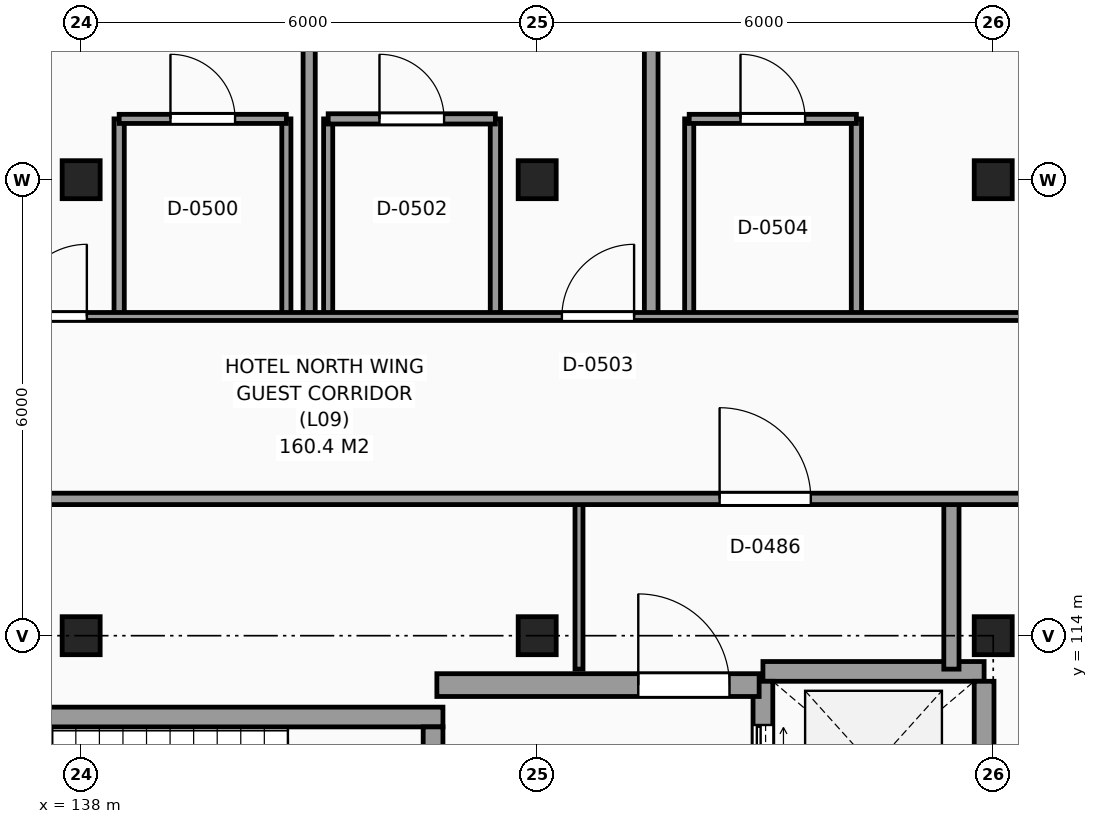
"""IFC4 building model, lengths in metres.
Left out: names, types, materials, properties, quantities, classifications, styles, units other than length and angle.
Written with IfcOpenShell. Run it as: python <this file> out.ifc"""

import sys

from ifc_helpers import new_model, si_unit, direction, frame, frame_2d, origin, origin_2d, place, context, subcontext, project, spatial, rectangle, extrude, element, fill, save


model = new_model("IFC4")
c1 = context("Model", 3, precision=1e-05, world=origin(), true_north=direction((0.0, 1.0)))
c2 = subcontext(c1, "Body", "Model", "MODEL_VIEW")
j1 = project(units=[si_unit("LENGTHUNIT", "METRE"), si_unit("PLANEANGLEUNIT", "RADIAN")], contexts=[c1])
p1 = place(None, origin())
s1 = spatial("IfcSite", under=j1, at=p1, CompositionType="ELEMENT")
p2 = place(p1, origin())
s2 = spatial("IfcBuilding", under=s1, at=p2, CompositionType="ELEMENT")
p3 = place(p2, frame((0.0, 0.0, 38.1)))
s3 = spatial("IfcBuildingStorey", under=s2, at=p3, CompositionType="ELEMENT", Elevation=38.1)
for number, where, z_axis, x_axis in (
    (1, (138.0, 114.0, 0.0), (0.0, 0.0, 1.0), (1.0, 0.0, 0.0)),
    (2, (138.0, 120.0, 0.0), (0.0, 0.0, 1.0), (1.0, 0.0, 0.0)),
    (3, (144.0, 114.0, 0.0), (0.0, 0.0, 1.0), (1.0, 0.0, 0.0)),
    (4, (144.0, 120.0, 0.0), (0.0, 0.0, 1.0), (1.0, 0.0, 0.0)),
    (5, (150.0, 114.0, 0.0), (0.0, 0.0, 1.0), (1.0, 0.0, 0.0)),
    (6, (150.0, 120.0, 0.0), (0.0, 0.0, 1.0), (1.0, 0.0, 0.0)),
):
    element("IfcColumn", number, at=place(p3, frame(where, z_axis=z_axis, x_axis=x_axis)), inside=s3, PredefinedType="COLUMN", context=c2, shape_type="SweptSolid", body=[
        extrude(rectangle(XDim=0.5, YDim=0.5, at=origin_2d()), origin(), (0.0, 0.0, 1.0), 3.3),
    ])
p4 = place(p3, frame((132.04, 112.93, 0.0), z_axis=(0.0, 0.0, 1.0), x_axis=(1.0, 0.0, 0.0)))
e7 = element("IfcWall", 7, at=p4, inside=s3, PredefinedType="SHEAR", context=c2, shape_type="SweptSolid", body=[
    extrude(rectangle(XDim=10.72, YDim=0.26, at=frame_2d((5.36, 0.0))), origin(), (0.0, 0.0, 1.0), 3.3),
])
p5 = place(p3, frame((142.63, 109.2, 0.0), z_axis=(0.0, 0.0, 1.0), x_axis=(0.0, 1.0, 0.0)))
e8 = element("IfcWall", 8, at=p5, inside=s3, PredefinedType="SHEAR", context=c2, shape_type="SweptSolid", body=[
    extrude(rectangle(XDim=3.6, YDim=0.26, at=frame_2d((1.8, 0.0))), origin(), (0.0, 0.0, 1.0), 3.3),
])
p6 = place(p5, frame((1.25, 0.0, 0.0)))
e9 = element("IfcOpeningElement", 9, at=p6, cuts=e8, PredefinedType="OPENING", context=c2, shape_type="SweptSolid", body=[
    extrude(rectangle(XDim=1.1, YDim=2.15, at=frame_2d((0.55, 1.075))), frame((0.0, 0.14, 0.0), z_axis=(0.0, -1.0, 0.0), x_axis=(1.0, 0.0, 0.0)), (0.0, 0.0, 1.0), 0.28),
])
p7 = place(p3, frame((146.97, 113.53, 0.0), z_axis=(0.0, 0.0, 1.0), x_axis=(1.0, 0.0, 0.0)))
e10 = element("IfcWall", 10, at=p7, inside=s3, PredefinedType="SHEAR", context=c2, shape_type="SweptSolid", body=[
    extrude(rectangle(XDim=2.91, YDim=0.26, at=frame_2d((1.455, 0.0))), origin(), (0.0, 0.0, 1.0), 3.3),
])
p8 = place(p3, frame((149.88, 111.15, 0.0), z_axis=(0.0, 0.0, 1.0), x_axis=(0.0, 1.0, 0.0)))
e11 = element("IfcWall", 11, at=p8, inside=s3, PredefinedType="SHEAR", context=c2, shape_type="SweptSolid", body=[
    extrude(rectangle(XDim=2.25, YDim=0.26, at=frame_2d((1.125, 0.0))), origin(), (0.0, 0.0, 1.0), 3.3),
])
p9 = place(p3, frame((146.97, 111.15, 0.0), z_axis=(0.0, 0.0, 1.0), x_axis=(0.0, 1.0, 0.0)))
e12 = element("IfcWall", 12, at=p9, inside=s3, PredefinedType="SHEAR", context=c2, shape_type="SweptSolid", body=[
    extrude(rectangle(XDim=2.25, YDim=0.26, at=frame_2d((1.125, 0.0))), origin(), (0.0, 0.0, 1.0), 3.3),
])
p10 = place(p9, frame((0.575, 0.0, 0.0)))
e13 = element("IfcOpeningElement", 13, at=p10, cuts=e12, PredefinedType="OPENING", context=c2, shape_type="SweptSolid", body=[
    extrude(rectangle(XDim=1.1, YDim=2.2, at=frame_2d((0.55, 1.1))), frame((0.0, 0.14, 0.0), z_axis=(0.0, -1.0, 0.0), x_axis=(1.0, 0.0, 0.0)), (0.0, 0.0, 1.0), 0.28),
])
p11 = place(p3, frame((142.68, 113.35, 0.0), z_axis=(0.0, 0.0, 1.0), x_axis=(1.0, 0.0, 0.0)))
e14 = element("IfcWall", 14, at=p11, inside=s3, PredefinedType="SHEAR", context=c2, shape_type="SweptSolid", body=[
    extrude(rectangle(XDim=4.24, YDim=0.3, at=frame_2d((2.12, 0.0))), origin(), (0.0, 0.0, 1.0), 3.3),
])
p12 = place(p11, frame((2.65, 0.0, 0.0)))
e15 = element("IfcOpeningElement", 15, at=p12, cuts=e14, PredefinedType="OPENING", context=c2, shape_type="SweptSolid", body=[
    extrude(rectangle(XDim=1.2, YDim=2.2, at=frame_2d((0.6, 1.1))), frame((0.0, 0.16, 0.0), z_axis=(0.0, -1.0, 0.0), x_axis=(1.0, 0.0, 0.0)), (0.0, 0.0, 1.0), 0.32),
])
p13 = place(p3, frame((138.5, 118.2, 0.0), z_axis=(0.0, 0.0, 1.0), x_axis=(0.0, 1.0, 0.0)))
e16 = element("IfcWall", 16, at=p13, inside=s3, PredefinedType="PARTITIONING", context=c2, shape_type="SweptSolid", body=[
    extrude(rectangle(XDim=2.6, YDim=0.135, at=frame_2d((1.3, 0.0))), origin(), (0.0, 0.0, 1.0), 3.06),
])
p14 = place(p3, frame((140.7, 118.2, 0.0), z_axis=(0.0, 0.0, 1.0), x_axis=(0.0, 1.0, 0.0)))
e17 = element("IfcWall", 17, at=p14, inside=s3, PredefinedType="PARTITIONING", context=c2, shape_type="SweptSolid", body=[
    extrude(rectangle(XDim=2.6, YDim=0.12, at=frame_2d((1.3, 0.0))), origin(), (0.0, 0.0, 1.0), 3.06),
])
p15 = place(p3, frame((141.0, 118.2, 0.0), z_axis=(0.0, 0.0, 1.0), x_axis=(0.0, 1.0, 0.0)))
e18 = element("IfcWall", 18, at=p15, inside=s3, PredefinedType="PARTITIONING", context=c2, shape_type="SweptSolid", body=[
    extrude(rectangle(XDim=7.585, YDim=0.16, at=frame_2d((3.792, 0.0))), origin(), (0.0, 0.0, 1.0), 3.06),
])
p16 = place(p3, frame((141.25, 118.2, 0.0), z_axis=(0.0, 0.0, 1.0), x_axis=(0.0, 1.0, 0.0)))
e19 = element("IfcWall", 19, at=p16, inside=s3, PredefinedType="PARTITIONING", context=c2, shape_type="SweptSolid", body=[
    extrude(rectangle(XDim=2.6, YDim=0.12, at=frame_2d((1.3, 0.0))), origin(), (0.0, 0.0, 1.0), 3.06),
])
p17 = place(p3, frame((143.45, 118.2, 0.0), z_axis=(0.0, 0.0, 1.0), x_axis=(0.0, 1.0, 0.0)))
e20 = element("IfcWall", 20, at=p17, inside=s3, PredefinedType="PARTITIONING", context=c2, shape_type="SweptSolid", body=[
    extrude(rectangle(XDim=2.6, YDim=0.135, at=frame_2d((1.3, 0.0))), origin(), (0.0, 0.0, 1.0), 3.06),
])
p18 = place(p3, frame((144.55, 113.56, 0.0), z_axis=(0.0, 0.0, 1.0), x_axis=(0.0, 1.0, 0.0)))
e21 = element("IfcWall", 21, at=p18, inside=s3, PredefinedType="PARTITIONING", context=c2, shape_type="SweptSolid", body=[
    extrude(rectangle(XDim=2.24, YDim=0.105, at=frame_2d((1.12, 0.0))), origin(), (0.0, 0.0, 1.0), 3.06),
])
p19 = place(p3, frame((145.5, 118.2, 0.0), z_axis=(0.0, 0.0, 1.0), x_axis=(0.0, 1.0, 0.0)))
e22 = element("IfcWall", 22, at=p19, inside=s3, PredefinedType="PARTITIONING", context=c2, shape_type="SweptSolid", body=[
    extrude(rectangle(XDim=7.565, YDim=0.18, at=frame_2d((3.782, 0.0))), origin(), (0.0, 0.0, 1.0), 3.06),
])
p20 = place(p3, frame((146.0, 118.2, 0.0), z_axis=(0.0, 0.0, 1.0), x_axis=(0.0, 1.0, 0.0)))
e23 = element("IfcWall", 23, at=p20, inside=s3, PredefinedType="PARTITIONING", context=c2, shape_type="SweptSolid", body=[
    extrude(rectangle(XDim=2.6, YDim=0.12, at=frame_2d((1.3, 0.0))), origin(), (0.0, 0.0, 1.0), 3.06),
])
p21 = place(p3, frame((148.2, 118.2, 0.0), z_axis=(0.0, 0.0, 1.0), x_axis=(0.0, 1.0, 0.0)))
e24 = element("IfcWall", 24, at=p21, inside=s3, PredefinedType="PARTITIONING", context=c2, shape_type="SweptSolid", body=[
    extrude(rectangle(XDim=2.6, YDim=0.135, at=frame_2d((1.3, 0.0))), origin(), (0.0, 0.0, 1.0), 3.06),
])
p22 = place(p3, frame((149.45, 113.56, 0.0), z_axis=(0.0, 0.0, 1.0), x_axis=(0.0, 1.0, 0.0)))
e25 = element("IfcWall", 25, at=p22, inside=s3, PredefinedType="PARTITIONING", context=c2, shape_type="SweptSolid", body=[
    extrude(rectangle(XDim=2.24, YDim=0.2, at=frame_2d((1.12, 0.0))), origin(), (0.0, 0.0, 1.0), 3.06),
])
p23 = place(p3, frame((102.215, 115.8, 0.0), z_axis=(0.0, 0.0, 1.0), x_axis=(1.0, 0.0, 0.0)))
e26 = element("IfcWall", 26, at=p23, inside=s3, PredefinedType="PARTITIONING", context=c2, shape_type="SweptSolid", body=[
    extrude(rectangle(XDim=67.585, YDim=0.15, at=frame_2d((33.792, 0.0))), origin(), (0.0, 0.0, 1.0), 3.06),
])
p24 = place(p23, frame((44.185, 0.0, 0.0)))
e27 = element("IfcOpeningElement", 27, at=p24, cuts=e26, PredefinedType="OPENING", context=c2, shape_type="SweptSolid", body=[
    extrude(rectangle(XDim=1.2, YDim=2.2, at=frame_2d((0.6, 1.1))), frame((0.0, 0.085, 0.0), z_axis=(0.0, -1.0, 0.0), x_axis=(1.0, 0.0, 0.0)), (0.0, 0.0, 1.0), 0.17),
])
p25 = place(p23, frame((14.185, 0.0, 0.0)))
e28 = element("IfcOpeningElement", 28, at=p25, cuts=e26, PredefinedType="OPENING", context=c2, shape_type="SweptSolid", body=[
    extrude(rectangle(XDim=1.2, YDim=2.2, at=frame_2d((0.6, 1.1))), frame((0.0, 0.085, 0.0), z_axis=(0.0, -1.0, 0.0), x_axis=(1.0, 0.0, 0.0)), (0.0, 0.0, 1.0), 0.17),
])
p26 = place(p23, frame((19.335, 0.0, 0.0)))
e29 = element("IfcOpeningElement", 29, at=p26, cuts=e26, PredefinedType="OPENING", context=c2, shape_type="SweptSolid", body=[
    extrude(rectangle(XDim=1.0, YDim=2.15, at=frame_2d((0.5, 1.075))), frame((0.0, 0.085, 0.0), z_axis=(0.0, -1.0, 0.0), x_axis=(1.0, 0.0, 0.0)), (0.0, 0.0, 1.0), 0.17),
])
p27 = place(p23, frame((26.305, 0.0, 0.0)))
e30 = element("IfcOpeningElement", 30, at=p27, cuts=e26, PredefinedType="OPENING", context=c2, shape_type="SweptSolid", body=[
    extrude(rectangle(XDim=0.96, YDim=2.15, at=frame_2d((0.48, 1.075))), frame((0.0, 0.085, 0.0), z_axis=(0.0, -1.0, 0.0), x_axis=(1.0, 0.0, 0.0)), (0.0, 0.0, 1.0), 0.17),
])
p28 = place(p23, frame((48.51, 0.0, 0.0)))
e31 = element("IfcOpeningElement", 31, at=p28, cuts=e26, PredefinedType="OPENING", context=c2, shape_type="SweptSolid", body=[
    extrude(rectangle(XDim=0.95, YDim=2.1, at=frame_2d((0.475, 1.05))), frame((0.0, 0.085, 0.0), z_axis=(0.0, -1.0, 0.0), x_axis=(1.0, 0.0, 0.0)), (0.0, 0.0, 1.0), 0.17),
])
p29 = place(p3, frame((102.215, 118.2, 0.0), z_axis=(0.0, 0.0, 1.0), x_axis=(1.0, 0.0, 0.0)))
e32 = element("IfcWall", 32, at=p29, inside=s3, PredefinedType="PARTITIONING", context=c2, shape_type="SweptSolid", body=[
    extrude(rectangle(XDim=74.285, YDim=0.105, at=frame_2d((37.143, 0.0))), origin(), (0.0, 0.0, 1.0), 3.06),
])
p30 = place(p29, frame((2.36, 0.0, 0.0)))
e33 = element("IfcOpeningElement", 33, at=p30, cuts=e32, PredefinedType="OPENING", context=c2, shape_type="SweptSolid", body=[
    extrude(rectangle(XDim=0.95, YDim=2.1, at=frame_2d((0.475, 1.05))), frame((0.0, 0.062, 0.0), z_axis=(0.0, -1.0, 0.0), x_axis=(1.0, 0.0, 0.0)), (0.0, 0.0, 1.0), 0.125),
])
p31 = place(p29, frame((9.41, 0.0, 0.0)))
e34 = element("IfcOpeningElement", 34, at=p31, cuts=e32, PredefinedType="OPENING", context=c2, shape_type="SweptSolid", body=[
    extrude(rectangle(XDim=0.95, YDim=2.1, at=frame_2d((0.475, 1.05))), frame((0.0, 0.062, 0.0), z_axis=(0.0, -1.0, 0.0), x_axis=(1.0, 0.0, 0.0)), (0.0, 0.0, 1.0), 0.125),
])
p32 = place(p29, frame((18.51, 0.0, 0.0)))
e35 = element("IfcOpeningElement", 35, at=p32, cuts=e32, PredefinedType="OPENING", context=c2, shape_type="SweptSolid", body=[
    extrude(rectangle(XDim=0.95, YDim=2.1, at=frame_2d((0.475, 1.05))), frame((0.0, 0.062, 0.0), z_axis=(0.0, -1.0, 0.0), x_axis=(1.0, 0.0, 0.0)), (0.0, 0.0, 1.0), 0.125),
])
p33 = place(p29, frame((32.36, 0.0, 0.0)))
e36 = element("IfcOpeningElement", 36, at=p33, cuts=e32, PredefinedType="OPENING", context=c2, shape_type="SweptSolid", body=[
    extrude(rectangle(XDim=0.95, YDim=2.1, at=frame_2d((0.475, 1.05))), frame((0.0, 0.062, 0.0), z_axis=(0.0, -1.0, 0.0), x_axis=(1.0, 0.0, 0.0)), (0.0, 0.0, 1.0), 0.125),
])
p34 = place(p29, frame((34.91, 0.0, 0.0)))
e37 = element("IfcOpeningElement", 37, at=p34, cuts=e32, PredefinedType="OPENING", context=c2, shape_type="SweptSolid", body=[
    extrude(rectangle(XDim=0.95, YDim=2.1, at=frame_2d((0.475, 1.05))), frame((0.0, 0.062, 0.0), z_axis=(0.0, -1.0, 0.0), x_axis=(1.0, 0.0, 0.0)), (0.0, 0.0, 1.0), 0.125),
])
p35 = place(p29, frame((42.11, 0.0, 0.0)))
e38 = element("IfcOpeningElement", 38, at=p35, cuts=e32, PredefinedType="OPENING", context=c2, shape_type="SweptSolid", body=[
    extrude(rectangle(XDim=0.95, YDim=2.1, at=frame_2d((0.475, 1.05))), frame((0.0, 0.062, 0.0), z_axis=(0.0, -1.0, 0.0), x_axis=(1.0, 0.0, 0.0)), (0.0, 0.0, 1.0), 0.125),
])
p36 = place(p29, frame((50.36, 0.0, 0.0)))
e39 = element("IfcOpeningElement", 39, at=p36, cuts=e32, PredefinedType="OPENING", context=c2, shape_type="SweptSolid", body=[
    extrude(rectangle(XDim=0.95, YDim=2.1, at=frame_2d((0.475, 1.05))), frame((0.0, 0.062, 0.0), z_axis=(0.0, -1.0, 0.0), x_axis=(1.0, 0.0, 0.0)), (0.0, 0.0, 1.0), 0.125),
])
p37 = place(p29, frame((52.91, 0.0, 0.0)))
e40 = element("IfcOpeningElement", 40, at=p37, cuts=e32, PredefinedType="OPENING", context=c2, shape_type="SweptSolid", body=[
    extrude(rectangle(XDim=0.95, YDim=2.1, at=frame_2d((0.475, 1.05))), frame((0.0, 0.062, 0.0), z_axis=(0.0, -1.0, 0.0), x_axis=(1.0, 0.0, 0.0)), (0.0, 0.0, 1.0), 0.125),
])
p38 = place(p29, frame((60.11, 0.0, 0.0)))
e41 = element("IfcOpeningElement", 41, at=p38, cuts=e32, PredefinedType="OPENING", context=c2, shape_type="SweptSolid", body=[
    extrude(rectangle(XDim=0.95, YDim=2.1, at=frame_2d((0.475, 1.05))), frame((0.0, 0.062, 0.0), z_axis=(0.0, -1.0, 0.0), x_axis=(1.0, 0.0, 0.0)), (0.0, 0.0, 1.0), 0.125),
])
p39 = place(p29, frame((64.31, 0.0, 0.0)))
e42 = element("IfcOpeningElement", 42, at=p39, cuts=e32, PredefinedType="OPENING", context=c2, shape_type="SweptSolid", body=[
    extrude(rectangle(XDim=0.95, YDim=2.1, at=frame_2d((0.475, 1.05))), frame((0.0, 0.062, 0.0), z_axis=(0.0, -1.0, 0.0), x_axis=(1.0, 0.0, 0.0)), (0.0, 0.0, 1.0), 0.125),
])
p40 = place(p29, frame((68.26, 0.0, 0.0)))
e43 = element("IfcOpeningElement", 43, at=p40, cuts=e32, PredefinedType="OPENING", context=c2, shape_type="SweptSolid", body=[
    extrude(rectangle(XDim=0.95, YDim=2.1, at=frame_2d((0.475, 1.05))), frame((0.0, 0.062, 0.0), z_axis=(0.0, -1.0, 0.0), x_axis=(1.0, 0.0, 0.0)), (0.0, 0.0, 1.0), 0.125),
])
p41 = place(p3, frame((138.5, 120.8, 0.0), z_axis=(0.0, 0.0, 1.0), x_axis=(1.0, 0.0, 0.0)))
e44 = element("IfcWall", 44, at=p41, inside=s3, PredefinedType="PARTITIONING", context=c2, shape_type="SweptSolid", body=[
    extrude(rectangle(XDim=2.2, YDim=0.12, at=frame_2d((1.1, 0.0))), origin(), (0.0, 0.0, 1.0), 3.06),
])
p42 = place(p41, frame((0.675, 0.0, 0.0)))
e45 = element("IfcOpeningElement", 45, at=p42, cuts=e44, PredefinedType="OPENING", context=c2, shape_type="SweptSolid", body=[
    extrude(rectangle(XDim=0.85, YDim=2.1, at=frame_2d((0.425, 1.05))), frame((0.0, 0.07, 0.0), z_axis=(0.0, -1.0, 0.0), x_axis=(1.0, 0.0, 0.0)), (0.0, 0.0, 1.0), 0.14),
])
p43 = place(p3, frame((141.25, 120.8, 0.0), z_axis=(0.0, 0.0, 1.0), x_axis=(1.0, 0.0, 0.0)))
e46 = element("IfcWall", 46, at=p43, inside=s3, PredefinedType="PARTITIONING", context=c2, shape_type="SweptSolid", body=[
    extrude(rectangle(XDim=2.2, YDim=0.135, at=frame_2d((1.1, 0.0))), origin(), (0.0, 0.0, 1.0), 3.06),
])
p44 = place(p43, frame((0.675, 0.0, 0.0)))
e47 = element("IfcOpeningElement", 47, at=p44, cuts=e46, PredefinedType="OPENING", context=c2, shape_type="SweptSolid", body=[
    extrude(rectangle(XDim=0.85, YDim=2.1, at=frame_2d((0.425, 1.05))), frame((0.0, 0.078, 0.0), z_axis=(0.0, -1.0, 0.0), x_axis=(1.0, 0.0, 0.0)), (0.0, 0.0, 1.0), 0.155),
])
p45 = place(p3, frame((146.0, 120.8, 0.0), z_axis=(0.0, 0.0, 1.0), x_axis=(1.0, 0.0, 0.0)))
e48 = element("IfcWall", 48, at=p45, inside=s3, PredefinedType="PARTITIONING", context=c2, shape_type="SweptSolid", body=[
    extrude(rectangle(XDim=2.2, YDim=0.12, at=frame_2d((1.1, 0.0))), origin(), (0.0, 0.0, 1.0), 3.06),
])
p46 = place(p45, frame((0.675, 0.0, 0.0)))
e49 = element("IfcOpeningElement", 49, at=p46, cuts=e48, PredefinedType="OPENING", context=c2, shape_type="SweptSolid", body=[
    extrude(rectangle(XDim=0.85, YDim=2.1, at=frame_2d((0.425, 1.05))), frame((0.0, 0.07, 0.0), z_axis=(0.0, -1.0, 0.0), x_axis=(1.0, 0.0, 0.0)), (0.0, 0.0, 1.0), 0.14),
])
p47 = place(p10, origin())
e50 = element("IfcDoor", 50, at=p47, inside=s3, OperationType="DOUBLE_DOOR_SLIDING", PredefinedType="DOOR", context=c2, shape_type="SweptSolid", body=[
    extrude(rectangle(XDim=1.1, YDim=2.2, at=frame_2d((0.55, 1.1))), frame((0.0, 0.025, 0.0), z_axis=(0.0, -1.0, 0.0), x_axis=(1.0, 0.0, 0.0)), (0.0, 0.0, 1.0), 0.05),
])
fill(e13, e50)
p48 = place(p12, origin())
e51 = element("IfcDoor", 51, at=p48, inside=s3, OperationType="SINGLE_SWING_LEFT", PredefinedType="DOOR", context=c2, shape_type="SweptSolid", body=[
    extrude(rectangle(XDim=1.2, YDim=2.2, at=frame_2d((0.6, 1.1))), frame((0.0, 0.025, 0.0), z_axis=(0.0, -1.0, 0.0), x_axis=(1.0, 0.0, 0.0)), (0.0, 0.0, 1.0), 0.05),
])
fill(e15, e51)
p49 = place(p24, origin())
e52 = element("IfcDoor", 52, at=p49, inside=s3, OperationType="SINGLE_SWING_LEFT", PredefinedType="DOOR", context=c2, shape_type="SweptSolid", body=[
    extrude(rectangle(XDim=1.2, YDim=2.2, at=frame_2d((0.6, 1.1))), frame((0.0, 0.025, 0.0), z_axis=(0.0, -1.0, 0.0), x_axis=(1.0, 0.0, 0.0)), (0.0, 0.0, 1.0), 0.05),
])
fill(e27, e52)
p50 = place(p42, origin())
e53 = element("IfcDoor", 53, at=p50, inside=s3, OperationType="SINGLE_SWING_LEFT", PredefinedType="DOOR", context=c2, shape_type="SweptSolid", body=[
    extrude(rectangle(XDim=0.85, YDim=2.1, at=frame_2d((0.425, 1.05))), frame((0.0, 0.025, 0.0), z_axis=(0.0, -1.0, 0.0), x_axis=(1.0, 0.0, 0.0)), (0.0, 0.0, 1.0), 0.05),
])
fill(e45, e53)
p51 = place(p34, origin())
e54 = element("IfcDoor", 54, at=p51, inside=s3, OperationType="SINGLE_SWING_RIGHT", PredefinedType="DOOR", context=c2, shape_type="SweptSolid", body=[
    extrude(rectangle(XDim=0.95, YDim=2.1, at=frame_2d((0.475, 1.05))), frame((0.0, 0.025, 0.0), z_axis=(0.0, -1.0, 0.0), x_axis=(1.0, 0.0, 0.0)), (0.0, 0.0, 1.0), 0.05),
])
fill(e37, e54)
p52 = place(p44, origin())
e55 = element("IfcDoor", 55, at=p52, inside=s3, OperationType="SINGLE_SWING_LEFT", PredefinedType="DOOR", context=c2, shape_type="SweptSolid", body=[
    extrude(rectangle(XDim=0.85, YDim=2.1, at=frame_2d((0.425, 1.05))), frame((0.0, 0.025, 0.0), z_axis=(0.0, -1.0, 0.0), x_axis=(1.0, 0.0, 0.0)), (0.0, 0.0, 1.0), 0.05),
])
fill(e47, e55)
p53 = place(p35, origin())
e56 = element("IfcDoor", 56, at=p53, inside=s3, OperationType="SINGLE_SWING_RIGHT", PredefinedType="DOOR", context=c2, shape_type="SweptSolid", body=[
    extrude(rectangle(XDim=0.95, YDim=2.1, at=frame_2d((0.475, 1.05))), frame((0.0, 0.025, 0.0), z_axis=(0.0, -1.0, 0.0), x_axis=(1.0, 0.0, 0.0)), (0.0, 0.0, 1.0), 0.05),
])
fill(e38, e56)
p54 = place(p46, origin())
e57 = element("IfcDoor", 57, at=p54, inside=s3, OperationType="SINGLE_SWING_LEFT", PredefinedType="DOOR", context=c2, shape_type="SweptSolid", body=[
    extrude(rectangle(XDim=0.85, YDim=2.1, at=frame_2d((0.425, 1.05))), frame((0.0, 0.025, 0.0), z_axis=(0.0, -1.0, 0.0), x_axis=(1.0, 0.0, 0.0)), (0.0, 0.0, 1.0), 0.05),
])
fill(e49, e57)
save(model, sys.argv[1])
